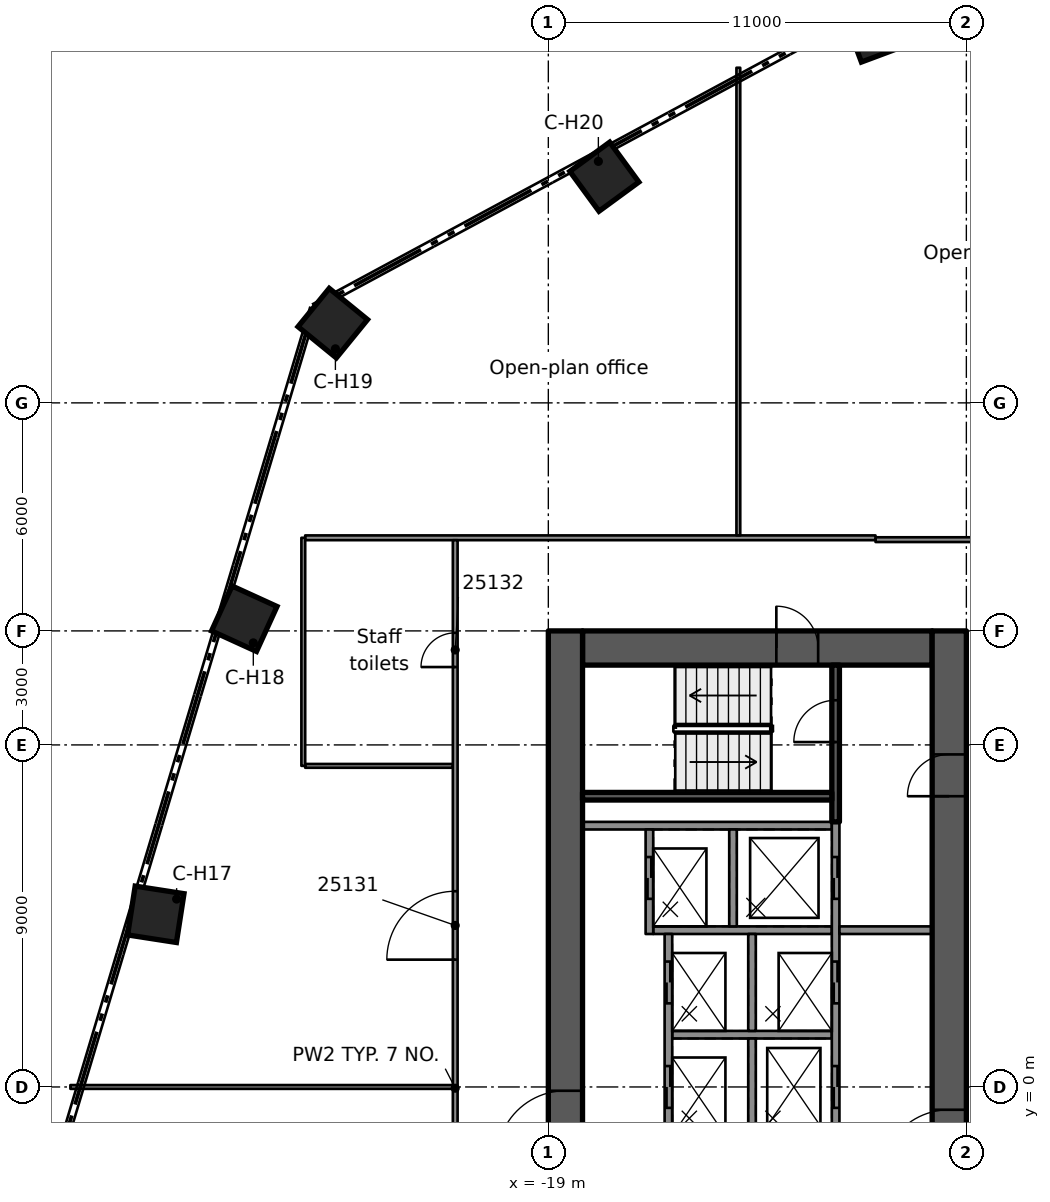
"""IFC4 building model, lengths in metres.
Left out: names, types, materials, properties, quantities, classifications, styles, units other than length and angle.
Written with IfcOpenShell. Run it as: python <this file> out.ifc"""

import sys

from ifc_helpers import new_model, si_unit, direction, frame, frame_2d, origin, origin_2d, place, context, subcontext, project, spatial, rectangle, extrude, element, fill, save


model = new_model("IFC4")
c1 = context("Model", 3, precision=1e-05, world=origin(), true_north=direction((0.0, 1.0)))
c2 = subcontext(c1, "Body", "Model", "MODEL_VIEW")
j1 = project(units=[si_unit("LENGTHUNIT", "METRE"), si_unit("PLANEANGLEUNIT", "RADIAN")], contexts=[c1])
p1 = place(None, origin())
s1 = spatial("IfcSite", under=j1, at=p1, CompositionType="ELEMENT")
p2 = place(p1, origin())
s2 = spatial("IfcBuilding", under=s1, at=p2, CompositionType="ELEMENT")
p3 = place(p2, frame((0.0, 0.0, 127.2)))
s3 = spatial("IfcBuildingStorey", under=s2, at=p3, CompositionType="ELEMENT", Elevation=127.2)
p4 = place(p3, frame((-18.1, 11.55, 0.0), z_axis=(0.0, 0.0, 1.0), x_axis=(1.0, 0.0, 0.0)))
e1 = element("IfcWall", 1, at=p4, inside=s3, PredefinedType="SHEAR", context=c2, shape_type="SweptSolid", body=[
    extrude(rectangle(XDim=9.2, YDim=0.9, at=frame_2d((4.6, 0.0))), origin(), (0.0, 0.0, 1.0), 3.5),
])
p5 = place(p4, frame((5.1, 0.0, 0.0)))
e2 = element("IfcOpeningElement", 2, at=p5, cuts=e1, PredefinedType="OPENING", context=c2, shape_type="SweptSolid", body=[
    extrude(rectangle(XDim=1.1, YDim=2.1, at=frame_2d((0.55, 1.05))), frame((0.0, 0.46, 0.0), z_axis=(0.0, -1.0, 0.0), x_axis=(1.0, 0.0, 0.0)), (0.0, 0.0, 1.0), 0.92),
])
p6 = place(p3, frame((-18.55, -12.0, 0.0), z_axis=(0.0, 0.0, 1.0), x_axis=(0.0, 1.0, 0.0)))
e3 = element("IfcWall", 3, at=p6, inside=s3, PredefinedType="SHEAR", context=c2, shape_type="SweptSolid", body=[
    extrude(rectangle(XDim=24.0, YDim=0.9, at=frame_2d((12.0, 0.0))), origin(), (0.0, 0.0, 1.0), 3.5),
])
p7 = place(p6, frame((10.1, 0.0, 0.0)))
e4 = element("IfcOpeningElement", 4, at=p7, cuts=e3, PredefinedType="OPENING", context=c2, shape_type="SweptSolid", body=[
    extrude(rectangle(XDim=1.8, YDim=2.1, at=frame_2d((0.9, 1.05))), frame((0.0, 0.46, 0.0), z_axis=(0.0, -1.0, 0.0), x_axis=(1.0, 0.0, 0.0)), (0.0, 0.0, 1.0), 0.92),
])
p8 = place(p3, frame((-8.45, -12.0, 0.0), z_axis=(0.0, 0.0, 1.0), x_axis=(0.0, 1.0, 0.0)))
e5 = element("IfcWall", 5, at=p8, inside=s3, PredefinedType="SHEAR", context=c2, shape_type="SweptSolid", body=[
    extrude(rectangle(XDim=24.0, YDim=0.9, at=frame_2d((12.0, 0.0))), origin(), (0.0, 0.0, 1.0), 3.5),
])
p9 = place(p8, frame((9.6, 0.0, 0.0)))
e6 = element("IfcOpeningElement", 6, at=p9, cuts=e5, PredefinedType="OPENING", context=c2, shape_type="SweptSolid", body=[
    extrude(rectangle(XDim=1.8, YDim=2.1, at=frame_2d((0.9, 1.05))), frame((0.0, 0.46, 0.0), z_axis=(0.0, -1.0, 0.0), x_axis=(1.0, 0.0, 0.0)), (0.0, 0.0, 1.0), 0.92),
])
p10 = place(p8, frame((19.65, 0.0, 0.0)))
e7 = element("IfcOpeningElement", 7, at=p10, cuts=e5, PredefinedType="OPENING", context=c2, shape_type="SweptSolid", body=[
    extrude(rectangle(XDim=1.1, YDim=2.1, at=frame_2d((0.55, 1.05))), frame((0.0, 0.46, 0.0), z_axis=(0.0, -1.0, 0.0), x_axis=(1.0, 0.0, 0.0)), (0.0, 0.0, 1.0), 0.92),
])
for number, where, z_axis, x_axis in (
    (8, (-29.329, 4.543, 0.0), (0.0, 0.0, 1.0), (-0.988, 0.153, 0.0)),
    (9, (-27.001, 12.321, 0.0), (0.0, 0.0, 1.0), (-0.91, 0.415, 0.0)),
    (10, (-24.672, 20.098, 0.0), (0.0, 0.0, 1.0), (-0.775, 0.632, 0.0)),
    (11, (-17.526, 23.951, 0.0), (0.0, 0.0, 1.0), (-0.591, 0.807, 0.0)),
    (12, (-10.38, 27.804, 0.0), (0.0, 0.0, 1.0), (-0.35, 0.937, 0.0)),
):
    element("IfcColumn", number, at=place(p3, frame(where, z_axis=z_axis, x_axis=x_axis)), inside=s3, PredefinedType="COLUMN", context=c2, shape_type="SweptSolid", body=[
        extrude(rectangle(XDim=1.3, YDim=1.3, at=origin_2d()), origin(), (0.0, 0.0, 1.0), 3.5),
    ])
p11 = place(p3, frame((-11.54, 6.875, 0.0), z_axis=(0.0, 0.0, 1.0), x_axis=(-1.0, 0.0, 0.0)))
e13 = element("IfcWall", 13, at=p11, inside=s3, PredefinedType="SOLIDWALL", context=c2, shape_type="SweptSolid", body=[
    extrude(rectangle(XDim=6.56, YDim=0.2, at=frame_2d((3.28, 0.0))), origin(), (0.0, 0.0, 1.0), 3.09),
])
p12 = place(p3, frame((-11.54, 1.375, 0.0), z_axis=(0.0, 0.0, 1.0), x_axis=(-1.0, 0.0, 0.0)))
e14 = element("IfcWall", 14, at=p12, inside=s3, PredefinedType="SOLIDWALL", context=c2, shape_type="SweptSolid", body=[
    extrude(rectangle(XDim=4.2, YDim=0.2, at=frame_2d((2.1, 0.0))), origin(), (0.0, 0.0, 1.0), 3.09),
])
p13 = place(p3, frame((-11.54, 4.125, 0.0), z_axis=(0.0, 0.0, 1.0), x_axis=(-1.0, 0.0, 0.0)))
e15 = element("IfcWall", 15, at=p13, inside=s3, PredefinedType="SOLIDWALL", context=c2, shape_type="SweptSolid", body=[
    extrude(rectangle(XDim=4.7, YDim=0.2, at=frame_2d((2.35, 0.0))), origin(), (0.0, 0.0, 1.0), 3.09),
])
p14 = place(p3, frame((-11.44, -6.975, 0.0), z_axis=(0.0, 0.0, 1.0), x_axis=(0.0, 1.0, 0.0)))
e16 = element("IfcWall", 16, at=p14, inside=s3, PredefinedType="SOLIDWALL", context=c2, shape_type="SweptSolid", body=[
    extrude(rectangle(XDim=13.95, YDim=0.2, at=frame_2d((6.975, 0.0))), origin(), (0.0, 0.0, 1.0), 3.09),
])
p15 = place(p14, frame((6.425, 0.0, 0.0)))
e17 = element("IfcOpeningElement", 17, at=p15, cuts=e16, PredefinedType="OPENING", context=c2, shape_type="SweptSolid", body=[
    extrude(rectangle(XDim=1.1, YDim=2.1, at=frame_2d((0.55, 1.05))), frame((0.0, 0.11, 0.0), z_axis=(0.0, -1.0, 0.0), x_axis=(1.0, 0.0, 0.0)), (0.0, 0.0, 1.0), 0.22),
])
p16 = place(p14, frame((9.175, 0.0, 0.0)))
e18 = element("IfcOpeningElement", 18, at=p16, cuts=e16, PredefinedType="OPENING", context=c2, shape_type="SweptSolid", body=[
    extrude(rectangle(XDim=1.1, YDim=2.1, at=frame_2d((0.55, 1.05))), frame((0.0, 0.11, 0.0), z_axis=(0.0, -1.0, 0.0), x_axis=(1.0, 0.0, 0.0)), (0.0, 0.0, 1.0), 0.22),
])
p17 = place(p14, frame((11.925, 0.0, 0.0)))
e19 = element("IfcOpeningElement", 19, at=p17, cuts=e16, PredefinedType="OPENING", context=c2, shape_type="SweptSolid", body=[
    extrude(rectangle(XDim=1.1, YDim=2.1, at=frame_2d((0.55, 1.05))), frame((0.0, 0.11, 0.0), z_axis=(0.0, -1.0, 0.0), x_axis=(1.0, 0.0, 0.0)), (0.0, 0.0, 1.0), 0.22),
])
p18 = place(p14, frame((1.075, 0.0, 0.0)))
e20 = element("IfcOpeningElement", 20, at=p18, cuts=e16, PredefinedType="OPENING", context=c2, shape_type="SweptSolid", body=[
    extrude(rectangle(XDim=0.8, YDim=2.1, at=frame_2d((0.4, 1.05))), frame((0.0, 0.11, 0.0), z_axis=(0.0, -1.0, 0.0), x_axis=(1.0, 0.0, 0.0)), (0.0, 0.0, 1.0), 0.22),
])
for number, where, z_axis, x_axis in (
    (21, (-13.64, -1.275, 0.0), (0.0, 0.0, 1.0), (0.0, 1.0, 0.0)),
    (22, (-13.64, 1.475, 0.0), (0.0, 0.0, 1.0), (0.0, 1.0, 0.0)),
    (23, (-14.14, 4.225, 0.0), (0.0, 0.0, 1.0), (0.0, 1.0, 0.0)),
):
    element("IfcWall", number, at=place(p3, frame(where, z_axis=z_axis, x_axis=x_axis)), inside=s3, PredefinedType="SOLIDWALL", context=c2, shape_type="SweptSolid", body=[
        extrude(rectangle(XDim=2.55, YDim=0.2, at=frame_2d((1.275, 0.0))), origin(), (0.0, 0.0, 1.0), 3.09),
    ])
p19 = place(p3, frame((-15.84, -4.025, 0.0), z_axis=(0.0, 0.0, 1.0), x_axis=(0.0, 1.0, 0.0)))
e24 = element("IfcWall", 24, at=p19, inside=s3, PredefinedType="SOLIDWALL", context=c2, shape_type="SweptSolid", body=[
    extrude(rectangle(XDim=8.05, YDim=0.2, at=frame_2d((4.025, 0.0))), origin(), (0.0, 0.0, 1.0), 3.09),
])
p20 = place(p19, frame((3.475, 0.0, 0.0)))
e25 = element("IfcOpeningElement", 25, at=p20, cuts=e24, PredefinedType="OPENING", context=c2, shape_type="SweptSolid", body=[
    extrude(rectangle(XDim=1.1, YDim=2.1, at=frame_2d((0.55, 1.05))), frame((0.0, 0.11, 0.0), z_axis=(0.0, -1.0, 0.0), x_axis=(1.0, 0.0, 0.0)), (0.0, 0.0, 1.0), 0.22),
])
p21 = place(p19, frame((6.225, 0.0, 0.0)))
e26 = element("IfcOpeningElement", 26, at=p21, cuts=e24, PredefinedType="OPENING", context=c2, shape_type="SweptSolid", body=[
    extrude(rectangle(XDim=1.1, YDim=2.1, at=frame_2d((0.55, 1.05))), frame((0.0, 0.11, 0.0), z_axis=(0.0, -1.0, 0.0), x_axis=(1.0, 0.0, 0.0)), (0.0, 0.0, 1.0), 0.22),
])
p22 = place(p3, frame((-16.34, 4.025, 0.0), z_axis=(0.0, 0.0, 1.0), x_axis=(0.0, 1.0, 0.0)))
e27 = element("IfcWall", 27, at=p22, inside=s3, PredefinedType="SOLIDWALL", context=c2, shape_type="SweptSolid", body=[
    extrude(rectangle(XDim=2.75, YDim=0.2, at=frame_2d((1.375, 0.0))), origin(), (0.0, 0.0, 1.0), 3.09),
])
p23 = place(p22, frame((0.925, 0.0, 0.0)))
e28 = element("IfcOpeningElement", 28, at=p23, cuts=e27, PredefinedType="OPENING", context=c2, shape_type="SweptSolid", body=[
    extrude(rectangle(XDim=1.1, YDim=2.1, at=frame_2d((0.55, 1.05))), frame((0.0, 0.11, 0.0), z_axis=(0.0, -1.0, 0.0), x_axis=(1.0, 0.0, 0.0)), (0.0, 0.0, 1.0), 0.22),
])
p24 = place(p3, frame((-11.44, 6.975, 0.0), z_axis=(0.0, 0.0, 1.0), x_axis=(0.0, 1.0, 0.0)))
e29 = element("IfcWall", 29, at=p24, inside=s3, PredefinedType="SOLIDWALL", context=c2, shape_type="SweptSolid", body=[
    extrude(rectangle(XDim=4.125, YDim=0.2, at=frame_2d((2.062, 0.0))), origin(), (0.0, 0.0, 1.0), 3.09),
])
p25 = place(p24, frame((2.1, 0.0, 0.0)))
e30 = element("IfcOpeningElement", 30, at=p25, cuts=e29, PredefinedType="OPENING", context=c2, shape_type="SweptSolid", body=[
    extrude(rectangle(XDim=1.1, YDim=2.1, at=frame_2d((0.55, 1.05))), frame((0.0, 0.11, 0.0), z_axis=(0.0, -1.0, 0.0), x_axis=(1.0, 0.0, 0.0)), (0.0, 0.0, 1.0), 0.22),
])
p26 = place(p3, frame((-11.54, 7.65, 0.0), z_axis=(0.0, 0.0, 1.0), x_axis=(-1.0, 0.0, 0.0)))
e31 = element("IfcWall", 31, at=p26, inside=s3, PredefinedType="SOLIDWALL", context=c2, shape_type="SweptSolid", body=[
    extrude(rectangle(XDim=6.56, YDim=0.2, at=frame_2d((3.28, 0.0))), origin(), (0.0, 0.0, 1.0), 3.09),
])
p27 = place(p3, frame((-8.9, 4.125, 0.0), z_axis=(0.0, 0.0, 1.0), x_axis=(-1.0, 0.0, 0.0)))
e32 = element("IfcWall", 32, at=p27, inside=s3, PredefinedType="PARTITIONING", context=c2, shape_type="SweptSolid", body=[
    extrude(rectangle(XDim=2.44, YDim=0.2, at=frame_2d((1.22, 0.0))), origin(), (0.0, 0.0, 1.0), 3.09),
])
p28 = place(p3, frame((-31.577, 0.0, 0.0), z_axis=(0.0, 0.0, 1.0), x_axis=(1.0, 0.0, 0.0)))
e33 = element("IfcWall", 33, at=p28, inside=s3, PredefinedType="PARTITIONING", context=c2, shape_type="SweptSolid", body=[
    extrude(rectangle(XDim=10.065, YDim=0.1, at=frame_2d((5.032, 0.0))), origin(), (0.0, 0.0, 1.0), 3.08),
])
p29 = place(p3, frame((-25.398, 8.449, 0.0), z_axis=(0.0, 0.0, 1.0), x_axis=(1.0, 0.0, 0.0)))
e34 = element("IfcWall", 34, at=p29, inside=s3, PredefinedType="PARTITIONING", context=c2, shape_type="SweptSolid", body=[
    extrude(rectangle(XDim=3.886, YDim=0.1, at=frame_2d((1.943, 0.0))), origin(), (0.0, 0.0, 1.0), 3.08),
])
p30 = place(p3, frame((-10.39, 14.401, 0.0), z_axis=(0.0, 0.0, 1.0), x_axis=(1.0, 0.0, 0.0)))
e35 = element("IfcWall", 35, at=p30, inside=s3, PredefinedType="PARTITIONING", context=c2, shape_type="SweptSolid", body=[
    extrude(rectangle(XDim=20.781, YDim=0.125, at=frame_2d((10.391, 0.0))), origin(), (0.0, 0.0, 1.0), 3.08),
])
p31 = place(p30, frame((14.74, 0.0, 0.0)))
e36 = element("IfcOpeningElement", 36, at=p31, cuts=e35, PredefinedType="OPENING", context=c2, shape_type="SweptSolid", body=[
    extrude(rectangle(XDim=1.8, YDim=2.1, at=frame_2d((0.9, 1.05))), frame((0.0, 0.073, 0.0), z_axis=(0.0, -1.0, 0.0), x_axis=(1.0, 0.0, 0.0)), (0.0, 0.0, 1.0), 0.145),
])
p32 = place(p30, frame((4.35, 0.0, 0.0)))
e37 = element("IfcOpeningElement", 37, at=p32, cuts=e35, PredefinedType="OPENING", context=c2, shape_type="SweptSolid", body=[
    extrude(rectangle(XDim=1.8, YDim=2.1, at=frame_2d((0.9, 1.05))), frame((0.0, 0.073, 0.0), z_axis=(0.0, -1.0, 0.0), x_axis=(1.0, 0.0, 0.0)), (0.0, 0.0, 1.0), 0.145),
])
p33 = place(p3, frame((-25.398, 14.45, 0.0), z_axis=(0.0, 0.0, 1.0), x_axis=(1.0, 0.0, 0.0)))
e38 = element("IfcWall", 38, at=p33, inside=s3, PredefinedType="PARTITIONING", context=c2, shape_type="SweptSolid", body=[
    extrude(rectangle(XDim=15.007, YDim=0.125, at=frame_2d((7.503, 0.0))), origin(), (0.0, 0.0, 1.0), 3.08),
])
p34 = place(p3, frame((-14.0, 14.514, 0.0), z_axis=(0.0, 0.0, 1.0), x_axis=(0.0, 1.0, 0.0)))
e39 = element("IfcWall", 39, at=p34, inside=s3, PredefinedType="PARTITIONING", context=c2, shape_type="SweptSolid", body=[
    extrude(rectangle(XDim=12.304, YDim=0.1, at=frame_2d((6.152, 0.0))), origin(), (0.0, 0.0, 1.0), 3.08),
])
p35 = place(p3, frame((-21.45, -14.451, 0.0), z_axis=(0.0, 0.0, 1.0), x_axis=(0.0, 1.0, 0.0)))
e40 = element("IfcWall", 40, at=p35, inside=s3, PredefinedType="PARTITIONING", context=c2, shape_type="SweptSolid", body=[
    extrude(rectangle(XDim=28.837, YDim=0.125, at=frame_2d((14.418, 0.0))), origin(), (0.0, 0.0, 1.0), 3.08),
])
p36 = place(p35, frame((10.327, 0.0, 0.0)))
e41 = element("IfcOpeningElement", 41, at=p36, cuts=e40, PredefinedType="OPENING", context=c2, shape_type="SweptSolid", body=[
    extrude(rectangle(XDim=1.1, YDim=2.1, at=frame_2d((0.55, 1.05))), frame((0.0, 0.073, 0.0), z_axis=(0.0, -1.0, 0.0), x_axis=(1.0, 0.0, 0.0)), (0.0, 0.0, 1.0), 0.145),
])
p37 = place(p35, frame((17.801, 0.0, 0.0)))
e42 = element("IfcOpeningElement", 42, at=p37, cuts=e40, PredefinedType="OPENING", context=c2, shape_type="SweptSolid", body=[
    extrude(rectangle(XDim=1.8, YDim=2.1, at=frame_2d((0.9, 1.05))), frame((0.0, 0.073, 0.0), z_axis=(0.0, -1.0, 0.0), x_axis=(1.0, 0.0, 0.0)), (0.0, 0.0, 1.0), 0.145),
])
p38 = place(p35, frame((25.5, 0.0, 0.0)))
e43 = element("IfcOpeningElement", 43, at=p38, cuts=e40, PredefinedType="OPENING", context=c2, shape_type="SweptSolid", body=[
    extrude(rectangle(XDim=0.9, YDim=2.1, at=frame_2d((0.45, 1.05))), frame((0.0, 0.073, 0.0), z_axis=(0.0, -1.0, 0.0), x_axis=(1.0, 0.0, 0.0)), (0.0, 0.0, 1.0), 0.145),
])
p39 = place(p3, frame((-25.448, 8.449, 0.0), z_axis=(0.0, 0.0, 1.0), x_axis=(0.0, 1.0, 0.0)))
e44 = element("IfcWall", 44, at=p39, inside=s3, PredefinedType="PARTITIONING", context=c2, shape_type="SweptSolid", body=[
    extrude(rectangle(XDim=6.001, YDim=0.1, at=frame_2d((3.0, 0.0))), origin(), (0.0, 0.0, 1.0), 3.08),
])
p40 = place(p15, origin())
e45 = element("IfcDoor", 45, at=p40, inside=s3, OperationType="DOUBLE_DOOR_SLIDING", PredefinedType="DOOR", context=c2, shape_type="SweptSolid", body=[
    extrude(rectangle(XDim=1.1, YDim=2.1, at=frame_2d((0.55, 1.05))), frame((0.0, 0.025, 0.0), z_axis=(0.0, -1.0, 0.0), x_axis=(1.0, 0.0, 0.0)), (0.0, 0.0, 1.0), 0.05),
])
fill(e17, e45)
p41 = place(p20, origin())
e46 = element("IfcDoor", 46, at=p41, inside=s3, OperationType="DOUBLE_DOOR_SLIDING", PredefinedType="DOOR", context=c2, shape_type="SweptSolid", body=[
    extrude(rectangle(XDim=1.1, YDim=2.1, at=frame_2d((0.55, 1.05))), frame((0.0, 0.025, 0.0), z_axis=(0.0, -1.0, 0.0), x_axis=(1.0, 0.0, 0.0)), (0.0, 0.0, 1.0), 0.05),
])
fill(e25, e46)
p42 = place(p16, origin())
e47 = element("IfcDoor", 47, at=p42, inside=s3, OperationType="DOUBLE_DOOR_SLIDING", PredefinedType="DOOR", context=c2, shape_type="SweptSolid", body=[
    extrude(rectangle(XDim=1.1, YDim=2.1, at=frame_2d((0.55, 1.05))), frame((0.0, 0.025, 0.0), z_axis=(0.0, -1.0, 0.0), x_axis=(1.0, 0.0, 0.0)), (0.0, 0.0, 1.0), 0.05),
])
fill(e18, e47)
p43 = place(p21, origin())
e48 = element("IfcDoor", 48, at=p43, inside=s3, OperationType="DOUBLE_DOOR_SLIDING", PredefinedType="DOOR", context=c2, shape_type="SweptSolid", body=[
    extrude(rectangle(XDim=1.1, YDim=2.1, at=frame_2d((0.55, 1.05))), frame((0.0, 0.025, 0.0), z_axis=(0.0, -1.0, 0.0), x_axis=(1.0, 0.0, 0.0)), (0.0, 0.0, 1.0), 0.05),
])
fill(e26, e48)
p44 = place(p17, origin())
e49 = element("IfcDoor", 49, at=p44, inside=s3, OperationType="DOUBLE_DOOR_SLIDING", PredefinedType="DOOR", context=c2, shape_type="SweptSolid", body=[
    extrude(rectangle(XDim=1.1, YDim=2.1, at=frame_2d((0.55, 1.05))), frame((0.0, 0.025, 0.0), z_axis=(0.0, -1.0, 0.0), x_axis=(1.0, 0.0, 0.0)), (0.0, 0.0, 1.0), 0.05),
])
fill(e19, e49)
p45 = place(p23, origin())
e50 = element("IfcDoor", 50, at=p45, inside=s3, OperationType="DOUBLE_DOOR_SLIDING", PredefinedType="DOOR", context=c2, shape_type="SweptSolid", body=[
    extrude(rectangle(XDim=1.1, YDim=2.1, at=frame_2d((0.55, 1.05))), frame((0.0, 0.025, 0.0), z_axis=(0.0, -1.0, 0.0), x_axis=(1.0, 0.0, 0.0)), (0.0, 0.0, 1.0), 0.05),
])
fill(e28, e50)
p46 = place(p9, origin())
e51 = element("IfcDoor", 51, at=p46, inside=s3, OperationType="SINGLE_SWING_LEFT", PredefinedType="DOOR", context=c2, shape_type="SweptSolid", body=[
    extrude(rectangle(XDim=1.8, YDim=2.1, at=frame_2d((0.9, 1.05))), frame((0.0, 0.025, 0.0), z_axis=(0.0, -1.0, 0.0), x_axis=(1.0, 0.0, 0.0)), (0.0, 0.0, 1.0), 0.05),
])
fill(e6, e51)
p47 = place(p7, origin())
e52 = element("IfcDoor", 52, at=p47, inside=s3, OperationType="SINGLE_SWING_LEFT", PredefinedType="DOOR", context=c2, shape_type="SweptSolid", body=[
    extrude(rectangle(XDim=1.8, YDim=2.1, at=frame_2d((0.9, 1.05))), frame((0.0, 0.025, 0.0), z_axis=(0.0, -1.0, 0.0), x_axis=(1.0, 0.0, 0.0)), (0.0, 0.0, 1.0), 0.05),
])
fill(e4, e52)
p48 = place(p10, origin())
e53 = element("IfcDoor", 53, at=p48, inside=s3, OperationType="SINGLE_SWING_RIGHT", PredefinedType="DOOR", context=c2, shape_type="SweptSolid", body=[
    extrude(rectangle(XDim=1.1, YDim=2.1, at=frame_2d((0.55, 1.05))), frame((0.0, 0.025, 0.0), z_axis=(0.0, -1.0, 0.0), x_axis=(1.0, 0.0, 0.0)), (0.0, 0.0, 1.0), 0.05),
])
fill(e7, e53)
p49 = place(p5, origin())
e54 = element("IfcDoor", 54, at=p49, inside=s3, OperationType="SINGLE_SWING_RIGHT", PredefinedType="DOOR", context=c2, shape_type="SweptSolid", body=[
    extrude(rectangle(XDim=1.1, YDim=2.1, at=frame_2d((0.55, 1.05))), frame((0.0, 0.025, 0.0), z_axis=(0.0, -1.0, 0.0), x_axis=(1.0, 0.0, 0.0)), (0.0, 0.0, 1.0), 0.05),
])
fill(e2, e54)
p50 = place(p25, origin())
e55 = element("IfcDoor", 55, at=p50, inside=s3, OperationType="SINGLE_SWING_RIGHT", PredefinedType="DOOR", context=c2, shape_type="SweptSolid", body=[
    extrude(rectangle(XDim=1.1, YDim=2.1, at=frame_2d((0.55, 1.05))), frame((0.0, 0.025, 0.0), z_axis=(0.0, -1.0, 0.0), x_axis=(1.0, 0.0, 0.0)), (0.0, 0.0, 1.0), 0.05),
])
fill(e30, e55)
p51 = place(p37, origin())
e56 = element("IfcDoor", 56, at=p51, inside=s3, OperationType="DOUBLE_DOOR_SINGLE_SWING", PredefinedType="DOOR", context=c2, shape_type="SweptSolid", body=[
    extrude(rectangle(XDim=1.8, YDim=2.1, at=frame_2d((0.9, 1.05))), frame((0.0, 0.025, 0.0), z_axis=(0.0, -1.0, 0.0), x_axis=(1.0, 0.0, 0.0)), (0.0, 0.0, 1.0), 0.05),
])
fill(e42, e56)
p52 = place(p38, origin())
e57 = element("IfcDoor", 57, at=p52, inside=s3, OperationType="SINGLE_SWING_RIGHT", PredefinedType="DOOR", context=c2, shape_type="SweptSolid", body=[
    extrude(rectangle(XDim=0.9, YDim=2.1, at=frame_2d((0.45, 1.05))), frame((0.0, 0.025, 0.0), z_axis=(0.0, -1.0, 0.0), x_axis=(1.0, 0.0, 0.0)), (0.0, 0.0, 1.0), 0.05),
])
fill(e43, e57)
save(model, sys.argv[1])
